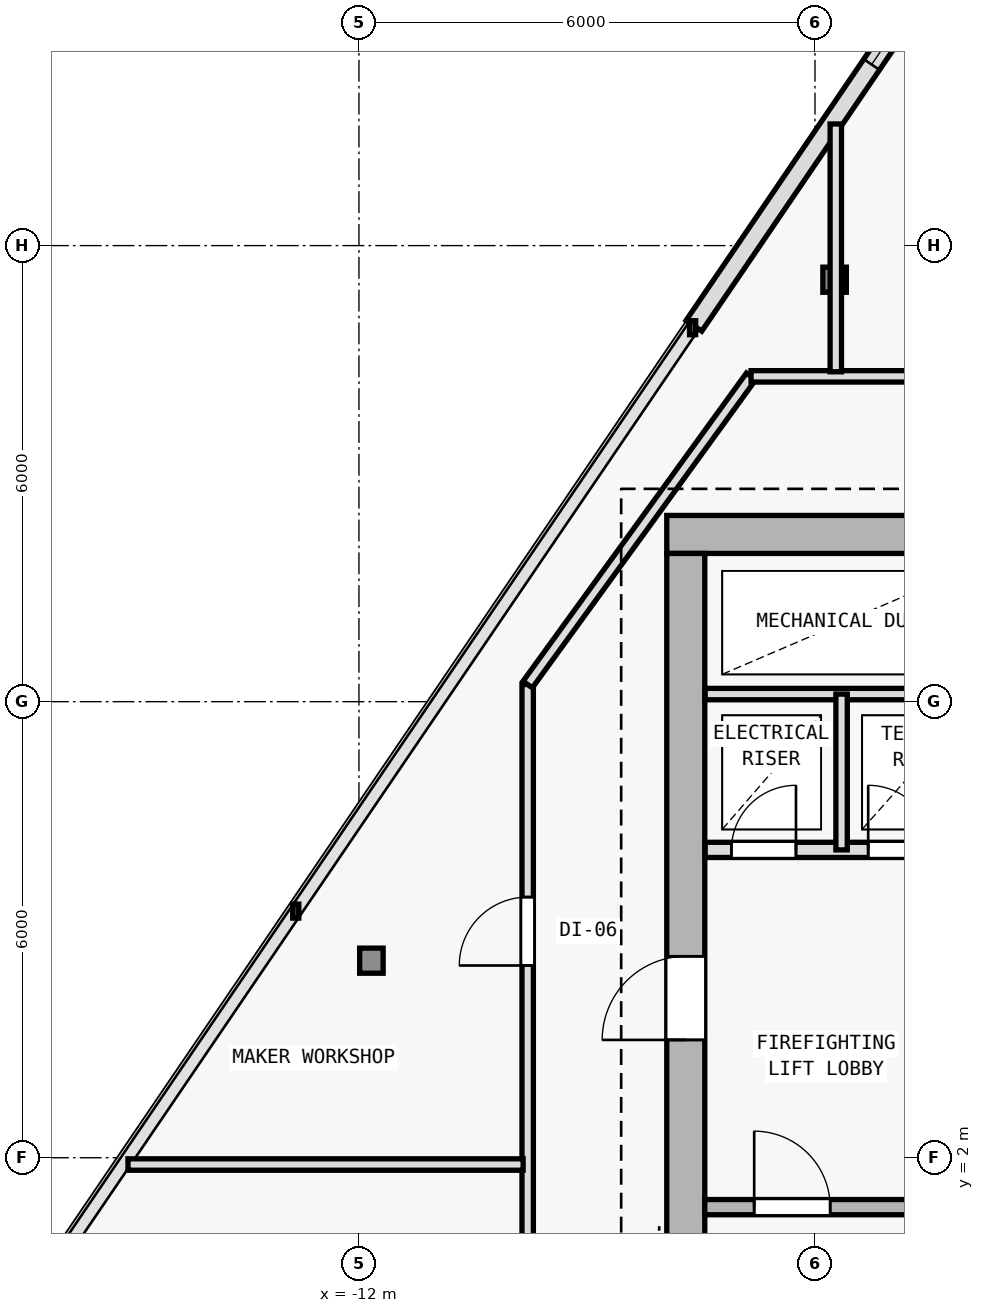
"""IFC4 building model, lengths in metres.
Left out: names, types, materials, properties, quantities, classifications, styles, units other than length and angle.
Written with IfcOpenShell. Run it as: python <this file> out.ifc"""

import sys

from ifc_helpers import new_model, si_unit, direction, frame, frame_2d, origin, origin_2d, place, context, subcontext, project, spatial, rectangle, i_section, extrude, element, fill, save


model = new_model("IFC4")
c1 = context("Model", 3, precision=1e-05, world=origin(), true_north=direction((0.0, 1.0)))
c2 = subcontext(c1, "Body", "Model", "MODEL_VIEW")
j1 = project(units=[si_unit("LENGTHUNIT", "METRE"), si_unit("PLANEANGLEUNIT", "RADIAN")], contexts=[c1])
p1 = place(None, origin())
s1 = spatial("IfcSite", under=j1, at=p1, CompositionType="ELEMENT")
p2 = place(p1, origin())
s2 = spatial("IfcBuilding", under=s1, at=p2, CompositionType="ELEMENT")
p3 = place(p2, frame((0.0, 0.0, 290.4)))
s3 = spatial("IfcBuildingStorey", under=s2, at=p3, CompositionType="ELEMENT", Elevation=290.4)
for number, where, z_axis, x_axis in (
    (1, (-7.7, 10.2, 0.0), (0.0, 0.0, 1.0), (1.0, 0.0, 0.0)),
    (2, (-7.7, 2.0, 0.0), (0.0, 0.0, 1.0), (1.0, 0.0, 0.0)),
):
    element("IfcColumn", number, at=place(p3, frame(where, z_axis=z_axis, x_axis=x_axis)), inside=s3, PredefinedType="COLUMN", context=c2, shape_type="SweptSolid", body=[
        extrude(i_section(OverallWidth=0.374, OverallDepth=0.372, WebThickness=0.012, FlangeThickness=0.02, FilletRadius=0.015, at=origin_2d()), origin(), (0.0, 0.0, 1.0), 3.6),
    ])
p4 = place(p3, frame((-5.742, 13.552, 0.006), z_axis=(0.008843162072, -0.002584924298, 0.999957557425), x_axis=(0.280566991813, 0.959834445675, 0.0)))
e3 = element("IfcColumn", 3, at=p4, inside=s3, PredefinedType="COLUMN", context=c2, shape_type="SweptSolid", body=[
    extrude(i_section(OverallWidth=0.309, OverallDepth=0.33, WebThickness=0.011, FlangeThickness=0.019, FilletRadius=0.027, at=origin_2d()), origin(), (0.0, 0.0, 1.0), 3.589),
])
p5 = place(p3, frame((-11.836, 4.593, 0.006), z_axis=(0.017003572908, 0.009522000828, 0.999810086971), x_axis=(-0.488603368932, 0.87250601595, 0.0)))
e4 = element("IfcColumn", 4, at=p5, inside=s3, PredefinedType="COLUMN", context=c2, shape_type="SweptSolid", body=[
    extrude(i_section(OverallWidth=0.309, OverallDepth=0.33, WebThickness=0.011, FlangeThickness=0.019, FilletRadius=0.027, at=origin_2d()), origin(), (0.0, 0.0, 1.0), 3.59),
])
p6 = place(p3, frame((-7.593, 12.945, 0.0), z_axis=(0.0, 0.0, 1.0), x_axis=(0.562476003565, 0.826813609838, 0.0)))
e5 = element("IfcWall", 5, at=p6, inside=s3, PredefinedType="SOLIDWALL", context=c2, shape_type="SweptSolid", body=[
    extrude(rectangle(XDim=9.816, YDim=0.25, at=frame_2d((4.908, 0.0))), origin(), (0.0, 0.0, 1.0), 3.15),
])
p7 = place(p6, frame((4.158, 0.0, 0.62)))
e6 = element("IfcOpeningElement", 6, at=p7, cuts=e5, PredefinedType="OPENING", context=c2, shape_type="SweptSolid", body=[
    extrude(rectangle(XDim=1.5, YDim=2.0, at=frame_2d((0.75, 1.0))), frame((0.0, 0.135, 0.0), z_axis=(0.0, -1.0, 0.0), x_axis=(1.0, 0.0, 0.0)), (0.0, 0.0, 1.0), 0.27),
])
p8 = place(p3, frame((7.95, 10.2, 0.0), z_axis=(0.0, 0.0, 1.0), x_axis=(-1.0, 0.0, 0.0)))
e7 = element("IfcWall", 7, at=p8, inside=s3, PredefinedType="SHEAR", context=c2, shape_type="SweptSolid", body=[
    extrude(rectangle(XDim=15.9, YDim=0.5, at=frame_2d((7.95, 0.0))), origin(), (0.0, 0.0, 1.0), 3.15),
])
p9 = place(p8, frame((4.4, 0.0, 0.0)))
e8 = element("IfcOpeningElement", 8, at=p9, cuts=e7, PredefinedType="OPENING", context=c2, shape_type="SweptSolid", body=[
    extrude(rectangle(XDim=1.1, YDim=2.15, at=frame_2d((0.55, 1.075))), frame((0.0, 0.26, 0.0), z_axis=(0.0, -1.0, 0.0), x_axis=(1.0, 0.0, 0.0)), (0.0, 0.0, 1.0), 0.52),
])
p10 = place(p3, frame((-7.7, -9.15, 0.0), z_axis=(0.0, 0.0, 1.0), x_axis=(0.0, 1.0, 0.0)))
e9 = element("IfcWall", 9, at=p10, inside=s3, PredefinedType="SHEAR", context=c2, shape_type="SweptSolid", body=[
    extrude(rectangle(XDim=19.1, YDim=0.5, at=frame_2d((9.55, 0.0))), origin(), (0.0, 0.0, 1.0), 3.15),
])
p11 = place(p10, frame((12.7, 0.0, 0.0)))
e10 = element("IfcOpeningElement", 10, at=p11, cuts=e9, PredefinedType="OPENING", context=c2, shape_type="SweptSolid", body=[
    extrude(rectangle(XDim=1.1, YDim=2.15, at=frame_2d((0.55, 1.075))), frame((0.0, 0.26, 0.0), z_axis=(0.0, -1.0, 0.0), x_axis=(1.0, 0.0, 0.0)), (0.0, 0.0, 1.0), 0.52),
])
p12 = place(p3, frame((-7.45, 1.35, 0.0), z_axis=(0.0, 0.0, 1.0), x_axis=(1.0, 0.0, 0.0)))
e11 = element("IfcWall", 11, at=p12, inside=s3, PredefinedType="SOLIDWALL", context=c2, shape_type="SweptSolid", body=[
    extrude(rectangle(XDim=3.4, YDim=0.2, at=frame_2d((1.7, 0.0))), origin(), (0.0, 0.0, 1.0), 3.15),
])
p13 = place(p12, frame((0.65, 0.0, 0.0)))
e12 = element("IfcOpeningElement", 12, at=p13, cuts=e11, PredefinedType="OPENING", context=c2, shape_type="SweptSolid", body=[
    extrude(rectangle(XDim=1.0, YDim=2.15, at=frame_2d((0.5, 1.075))), frame((0.0, 0.11, 0.0), z_axis=(0.0, -1.0, 0.0), x_axis=(1.0, 0.0, 0.0)), (0.0, 0.0, 1.0), 0.22),
])
p14 = place(p3, frame((-7.445, 6.05, 0.0), z_axis=(0.0, 0.0, 1.0), x_axis=(1.0, 0.0, 0.0)))
e13 = element("IfcWall", 13, at=p14, inside=s3, PredefinedType="SOLIDWALL", context=c2, shape_type="SweptSolid", body=[
    extrude(rectangle(XDim=3.595, YDim=0.2, at=frame_2d((1.797, 0.0))), origin(), (0.0, 0.0, 1.0), 3.15),
])
p15 = place(p14, frame((0.345, 0.0, 0.0)))
e14 = element("IfcOpeningElement", 14, at=p15, cuts=e13, PredefinedType="OPENING", context=c2, shape_type="SweptSolid", body=[
    extrude(rectangle(XDim=0.85, YDim=2.1, at=frame_2d((0.425, 1.05))), frame((0.0, 0.11, 0.0), z_axis=(0.0, -1.0, 0.0), x_axis=(1.0, 0.0, 0.0)), (0.0, 0.0, 1.0), 0.22),
])
p16 = place(p14, frame((2.145, 0.0, 0.0)))
e15 = element("IfcOpeningElement", 15, at=p16, cuts=e13, PredefinedType="OPENING", context=c2, shape_type="SweptSolid", body=[
    extrude(rectangle(XDim=0.85, YDim=2.1, at=frame_2d((0.425, 1.05))), frame((0.0, 0.11, 0.0), z_axis=(0.0, -1.0, 0.0), x_axis=(1.0, 0.0, 0.0)), (0.0, 0.0, 1.0), 0.22),
])
p17 = place(p3, frame((-7.445, 8.1, 0.0), z_axis=(0.0, 0.0, 1.0), x_axis=(1.0, 0.0, 0.0)))
e16 = element("IfcWall", 16, at=p17, inside=s3, PredefinedType="PARTITIONING", context=c2, shape_type="SweptSolid", body=[
    extrude(rectangle(XDim=3.595, YDim=0.15, at=frame_2d((1.797, 0.0))), origin(), (0.0, 0.0, 1.0), 3.15),
])
p18 = place(p3, frame((-5.65, 6.05, 0.0), z_axis=(0.0, 0.0, 1.0), x_axis=(0.0, 1.0, 0.0)))
e17 = element("IfcWall", 17, at=p18, inside=s3, PredefinedType="PARTITIONING", context=c2, shape_type="SweptSolid", body=[
    extrude(rectangle(XDim=2.05, YDim=0.15, at=frame_2d((1.025, 0.0))), origin(), (0.0, 0.0, 1.0), 3.15),
])
p19 = place(p3, frame((-9.78, -11.48, 0.0), z_axis=(0.0, 0.0, 1.0), x_axis=(0.0, 1.0, 0.0)))
e18 = element("IfcWall", 18, at=p19, inside=s3, PredefinedType="PARTITIONING", context=c2, shape_type="SweptSolid", body=[
    extrude(rectangle(XDim=19.706, YDim=0.15, at=frame_2d((9.853, 0.0))), origin(), (0.0, 0.0, 1.0), 2.675),
])
p20 = place(p19, frame((9.822, 0.0, 0.0)))
e19 = element("IfcOpeningElement", 19, at=p20, cuts=e18, PredefinedType="OPENING", context=c2, shape_type="SweptSolid", body=[
    extrude(rectangle(XDim=0.9, YDim=2.1, at=frame_2d((0.45, 1.05))), frame((0.0, 0.085, 0.0), z_axis=(0.0, -1.0, 0.0), x_axis=(1.0, 0.0, 0.0)), (0.0, 0.0, 1.0), 0.17),
])
p21 = place(p19, frame((5.905, 0.0, 0.0)))
e20 = element("IfcOpeningElement", 20, at=p21, cuts=e18, PredefinedType="OPENING", context=c2, shape_type="SweptSolid", body=[
    extrude(rectangle(XDim=0.85, YDim=2.1, at=frame_2d((0.425, 1.05))), frame((0.0, 0.085, 0.0), z_axis=(0.0, -1.0, 0.0), x_axis=(1.0, 0.0, 0.0)), (0.0, 0.0, 1.0), 0.17),
])
p22 = place(p19, frame((4.384, 0.0, 0.0)))
e21 = element("IfcOpeningElement", 21, at=p22, cuts=e18, PredefinedType="OPENING", context=c2, shape_type="SweptSolid", body=[
    extrude(rectangle(XDim=0.85, YDim=2.1, at=frame_2d((0.425, 1.05))), frame((0.0, 0.085, 0.0), z_axis=(0.0, -1.0, 0.0), x_axis=(1.0, 0.0, 0.0)), (0.0, 0.0, 1.0), 0.17),
])
p23 = place(p19, frame((2.678, 0.0, 0.0)))
e22 = element("IfcOpeningElement", 22, at=p23, cuts=e18, PredefinedType="OPENING", context=c2, shape_type="SweptSolid", body=[
    extrude(rectangle(XDim=0.9, YDim=2.1, at=frame_2d((0.45, 1.05))), frame((0.0, 0.085, 0.0), z_axis=(0.0, -1.0, 0.0), x_axis=(1.0, 0.0, 0.0)), (0.0, 0.0, 1.0), 0.17),
])
p24 = place(p19, frame((0.713, 0.0, 0.0)))
e23 = element("IfcOpeningElement", 23, at=p24, cuts=e18, PredefinedType="OPENING", context=c2, shape_type="SweptSolid", body=[
    extrude(rectangle(XDim=0.9, YDim=2.1, at=frame_2d((0.45, 1.05))), frame((0.0, 0.085, 0.0), z_axis=(0.0, -1.0, 0.0), x_axis=(1.0, 0.0, 0.0)), (0.0, 0.0, 1.0), 0.17),
])
p25 = place(p19, frame((16.009, 0.0, 0.0)))
e24 = element("IfcOpeningElement", 24, at=p25, cuts=e18, PredefinedType="OPENING", context=c2, shape_type="SweptSolid", body=[
    extrude(rectangle(XDim=0.9, YDim=2.1, at=frame_2d((0.45, 1.05))), frame((0.0, 0.085, 0.0), z_axis=(0.0, -1.0, 0.0), x_axis=(1.0, 0.0, 0.0)), (0.0, 0.0, 1.0), 0.17),
])
p26 = place(p3, frame((-9.78, 8.226, 0.0), z_axis=(0.0, 0.0, 1.0), x_axis=(0.586956386413, 0.809618552436, 0.0)))
e25 = element("IfcWall", 25, at=p26, inside=s3, PredefinedType="PARTITIONING", context=c2, shape_type="SweptSolid", body=[
    extrude(rectangle(XDim=5.008, YDim=0.15, at=frame_2d((2.504, 0.0))), origin(), (0.0, 0.0, 1.0), 2.815),
])
p27 = place(p3, frame((-6.841, 12.28, 0.0), z_axis=(0.0, 0.0, 1.0), x_axis=(1.0, 0.0, 0.0)))
e26 = element("IfcWall", 26, at=p27, inside=s3, PredefinedType="PARTITIONING", context=c2, shape_type="SweptSolid", body=[
    extrude(rectangle(XDim=13.682, YDim=0.15, at=frame_2d((6.841, 0.0))), origin(), (0.0, 0.0, 1.0), 2.815),
])
p28 = place(p27, frame((12.422, 0.0, 0.0)))
e27 = element("IfcOpeningElement", 27, at=p28, cuts=e26, PredefinedType="OPENING", context=c2, shape_type="SweptSolid", body=[
    extrude(rectangle(XDim=0.85, YDim=2.1, at=frame_2d((0.425, 1.05))), frame((0.0, 0.085, 0.0), z_axis=(0.0, -1.0, 0.0), x_axis=(1.0, 0.0, 0.0)), (0.0, 0.0, 1.0), 0.17),
])
p29 = place(p27, frame((10.305, 0.0, 0.0)))
e28 = element("IfcOpeningElement", 28, at=p29, cuts=e26, PredefinedType="OPENING", context=c2, shape_type="SweptSolid", body=[
    extrude(rectangle(XDim=0.9, YDim=2.1, at=frame_2d((0.45, 1.05))), frame((0.0, 0.085, 0.0), z_axis=(0.0, -1.0, 0.0), x_axis=(1.0, 0.0, 0.0)), (0.0, 0.0, 1.0), 0.17),
])
p30 = place(p27, frame((6.794, 0.0, 0.0)))
e29 = element("IfcOpeningElement", 29, at=p30, cuts=e26, PredefinedType="OPENING", context=c2, shape_type="SweptSolid", body=[
    extrude(rectangle(XDim=0.9, YDim=2.1, at=frame_2d((0.45, 1.05))), frame((0.0, 0.085, 0.0), z_axis=(0.0, -1.0, 0.0), x_axis=(1.0, 0.0, 0.0)), (0.0, 0.0, 1.0), 0.17),
])
p31 = place(p27, frame((2.717, 0.0, 0.0)))
e30 = element("IfcOpeningElement", 30, at=p31, cuts=e26, PredefinedType="OPENING", context=c2, shape_type="SweptSolid", body=[
    extrude(rectangle(XDim=0.9, YDim=2.1, at=frame_2d((0.45, 1.05))), frame((0.0, 0.085, 0.0), z_axis=(0.0, -1.0, 0.0), x_axis=(1.0, 0.0, 0.0)), (0.0, 0.0, 1.0), 0.17),
])
p32 = place(p3, frame((-5.726, 12.34, 0.0), z_axis=(0.0, 0.0, 1.0), x_axis=(0.0, 1.0, 0.0)))
e31 = element("IfcWall", 31, at=p32, inside=s3, PredefinedType="PARTITIONING", context=c2, shape_type="SweptSolid", body=[
    extrude(rectangle(XDim=3.26, YDim=0.15, at=frame_2d((1.63, 0.0))), origin(), (0.0, 0.0, 1.0), 2.815),
])
p33 = place(p3, frame((-9.84, 1.911, 0.0), z_axis=(0.0, 0.0, 1.0), x_axis=(-1.0, 0.0, 0.0)))
e32 = element("IfcWall", 32, at=p33, inside=s3, PredefinedType="PARTITIONING", context=c2, shape_type="SweptSolid", body=[
    extrude(rectangle(XDim=5.199, YDim=0.15, at=frame_2d((2.6, 0.0))), origin(), (0.0, 0.0, 1.0), 2.795),
])
p34 = place(p7, origin())
e33 = element("IfcWindow", 33, at=p34, inside=s3, PartitioningType="SINGLE_PANEL", PredefinedType="WINDOW", context=c2, shape_type="SweptSolid", body=[
    extrude(rectangle(XDim=1.5, YDim=2.0, at=frame_2d((0.75, 1.0))), frame((0.0, 0.03, 0.0), z_axis=(0.0, -1.0, 0.0), x_axis=(1.0, 0.0, 0.0)), (0.0, 0.0, 1.0), 0.06),
])
fill(e6, e33)
p35 = place(p11, origin())
e34 = element("IfcDoor", 34, at=p35, inside=s3, OperationType="SINGLE_SWING_LEFT", PredefinedType="DOOR", context=c2, shape_type="SweptSolid", body=[
    extrude(rectangle(XDim=1.1, YDim=2.15, at=frame_2d((0.55, 1.075))), frame((0.0, 0.025, 0.0), z_axis=(0.0, -1.0, 0.0), x_axis=(1.0, 0.0, 0.0)), (0.0, 0.0, 1.0), 0.05),
])
fill(e10, e34)
p36 = place(p13, origin())
e35 = element("IfcDoor", 35, at=p36, inside=s3, OperationType="SINGLE_SWING_LEFT", PredefinedType="DOOR", context=c2, shape_type="SweptSolid", body=[
    extrude(rectangle(XDim=1.0, YDim=2.15, at=frame_2d((0.5, 1.075))), frame((0.0, 0.025, 0.0), z_axis=(0.0, -1.0, 0.0), x_axis=(1.0, 0.0, 0.0)), (0.0, 0.0, 1.0), 0.05),
])
fill(e12, e35)
p37 = place(p15, origin())
e36 = element("IfcDoor", 36, at=p37, inside=s3, OperationType="SINGLE_SWING_RIGHT", PredefinedType="DOOR", context=c2, shape_type="SweptSolid", body=[
    extrude(rectangle(XDim=0.85, YDim=2.1, at=frame_2d((0.425, 1.05))), frame((0.0, 0.025, 0.0), z_axis=(0.0, -1.0, 0.0), x_axis=(1.0, 0.0, 0.0)), (0.0, 0.0, 1.0), 0.05),
])
fill(e14, e36)
p38 = place(p16, origin())
e37 = element("IfcDoor", 37, at=p38, inside=s3, OperationType="SINGLE_SWING_LEFT", PredefinedType="DOOR", context=c2, shape_type="SweptSolid", body=[
    extrude(rectangle(XDim=0.85, YDim=2.1, at=frame_2d((0.425, 1.05))), frame((0.0, 0.025, 0.0), z_axis=(0.0, -1.0, 0.0), x_axis=(1.0, 0.0, 0.0)), (0.0, 0.0, 1.0), 0.05),
])
fill(e15, e37)
p39 = place(p25, origin())
e38 = element("IfcDoor", 38, at=p39, inside=s3, OperationType="SINGLE_SWING_LEFT", PredefinedType="DOOR", context=c2, shape_type="SweptSolid", body=[
    extrude(rectangle(XDim=0.9, YDim=2.1, at=frame_2d((0.45, 1.05))), frame((0.0, 0.025, 0.0), z_axis=(0.0, -1.0, 0.0), x_axis=(1.0, 0.0, 0.0)), (0.0, 0.0, 1.0), 0.05),
])
fill(e24, e38)
save(model, sys.argv[1])
